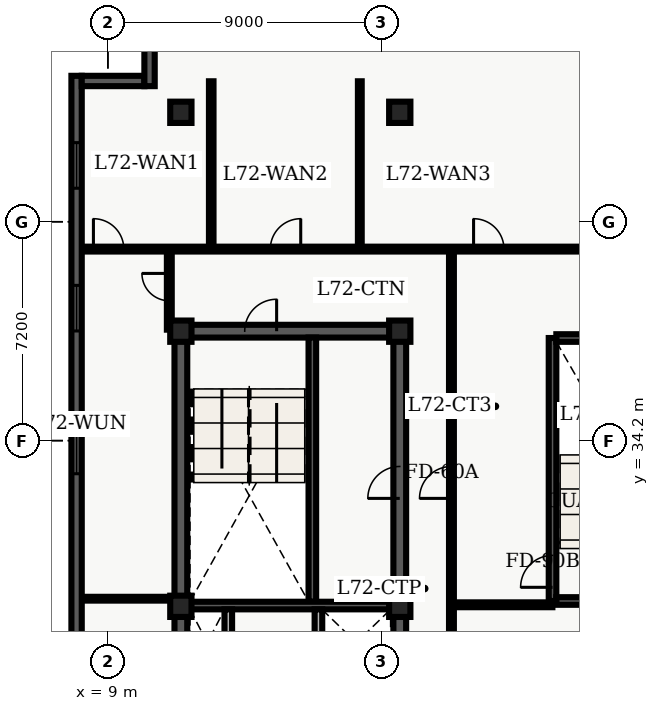
"""IFC4 building model, lengths in metres.
Left out: names, types, materials, properties, quantities, classifications, styles, units other than length and angle.
Written with IfcOpenShell. Run it as: python <this file> out.ifc"""

import sys

from ifc_helpers import new_model, entity, si_unit, converted_unit, direction, frame, origin_with_axes, origin_2d_with_axis, place, context, subcontext, project, spatial, polyline, rectangle, outline, extrude, element, fill, save


model = new_model("IFC4")
c1 = context("Model", 3, precision=1e-05, world=origin_with_axes(), true_north=direction((0.0, 1.0)))
c2 = subcontext(c1, "Body", "Model", "MODEL_VIEW")
j1 = project(units=[si_unit("LENGTHUNIT", "METRE"), converted_unit("PLANEANGLEUNIT", "DEGREE", entity("IfcPlaneAngleMeasure", 0.017), si_unit("PLANEANGLEUNIT", "RADIAN"), dimensions=[0, 0, 0, 0, 0, 0, 0])], contexts=[c1])
p1 = place(None, origin_with_axes())
s1 = spatial("IfcSite", under=j1, at=p1, CompositionType="ELEMENT")
p2 = place(p1, origin_with_axes())
s2 = spatial("IfcBuilding", under=s1, at=p2, CompositionType="ELEMENT")
p3 = place(p2, frame((0.0, 0.0, 291.9), z_axis=(0.0, 0.0, 1.0), x_axis=(1.0, 0.0, 0.0)))
s3 = spatial("IfcBuildingStorey", under=s2, at=p3, CompositionType="ELEMENT", Elevation=291.9)
p4 = place(p3, frame((11.4, 10.8, 0.0), z_axis=(0.0, 0.0, 1.0), x_axis=(0.0, 1.0, 0.0)))
e1 = element("IfcWall", 1, at=p4, inside=s3, PredefinedType="SHEAR", context=c2, shape_type="SweptSolid", body=[
    extrude(outline(polyline([(0.0, -0.21), (27.0, -0.21), (27.0, 0.21), (0.0, 0.21), (0.0, -0.21)])), origin_with_axes(), (0.0, 0.0, 1.0), 3.66),
])
p5 = place(p3, frame((11.4, 37.8, 0.0), z_axis=(0.0, 0.0, 1.0), x_axis=(1.0, 0.0, 0.0)))
e2 = element("IfcWall", 2, at=p5, inside=s3, PredefinedType="SHEAR", context=c2, shape_type="SweptSolid", body=[
    extrude(outline(polyline([(0.0, -0.21), (7.2, -0.21), (7.2, 0.21), (0.0, 0.21), (0.0, -0.21)])), origin_with_axes(), (0.0, 0.0, 1.0), 3.66),
])
p6 = place(p5, frame((2.625, 0.0, 0.0), z_axis=(0.0, 0.0, 1.0), x_axis=(1.0, 0.0, 0.0)))
e3 = element("IfcOpeningElement", 3, at=p6, cuts=e2, PredefinedType="OPENING", context=c2, shape_type="SweptSolid", body=[
    extrude(rectangle(XDim=1.05, YDim=0.44, at=origin_2d_with_axis()), origin_with_axes(), (0.0, 0.0, 1.0), 2.15),
])
p7 = place(p3, frame((18.6, 24.3, 0.0), z_axis=(0.0, 0.0, 1.0), x_axis=(0.0, 1.0, 0.0)))
e4 = element("IfcWall", 4, at=p7, inside=s3, PredefinedType="SHEAR", context=c2, shape_type="SweptSolid", body=[
    extrude(outline(polyline([(0.0, -0.21), (13.5, -0.21), (13.5, 0.21), (0.0, 0.21), (0.0, -0.21)])), origin_with_axes(), (0.0, 0.0, 1.0), 3.66),
])
p8 = place(p7, frame((8.525, 0.0, 0.0), z_axis=(0.0, 0.0, 1.0), x_axis=(1.0, 0.0, 0.0)))
e5 = element("IfcOpeningElement", 5, at=p8, cuts=e4, PredefinedType="OPENING", context=c2, shape_type="SweptSolid", body=[
    extrude(rectangle(XDim=1.05, YDim=0.44, at=origin_2d_with_axis()), origin_with_axes(), (0.0, 0.0, 1.0), 2.15),
])
p9 = place(p3, frame((15.725, 28.9, 0.0), z_axis=(0.0, 0.0, 1.0), x_axis=(0.0, 1.0, 0.0)))
e6 = element("IfcWall", 6, at=p9, inside=s3, PredefinedType="SHEAR", context=c2, shape_type="SweptSolid", body=[
    extrude(outline(polyline([(0.0, -0.125), (8.69, -0.125), (8.69, 0.125), (0.0, 0.125), (0.0, -0.125)])), origin_with_axes(), (0.0, 0.0, 1.0), 3.66),
])
p10 = place(p3, frame((11.61, 28.775, 0.0), z_axis=(0.0, 0.0, 1.0), x_axis=(1.0, 0.0, 0.0)))
e7 = element("IfcWall", 7, at=p10, inside=s3, PredefinedType="SHEAR", context=c2, shape_type="SweptSolid", body=[
    extrude(outline(polyline([(0.0, -0.125), (6.78, -0.125), (6.78, 0.125), (0.0, 0.125), (0.0, -0.125)])), origin_with_axes(), (0.0, 0.0, 1.0), 3.66),
])
for number, where, z_axis, x_axis in (
    (8, (12.96, 26.45, 0.0), (0.0, 0.0, 1.0), (0.0, 1.0, 0.0)),
    (9, (15.925, 26.45, 0.0), (0.0, 0.0, 1.0), (0.0, 1.0, 0.0)),
):
    element("IfcWall", number, at=place(p3, frame(where, z_axis=z_axis, x_axis=x_axis)), inside=s3, PredefinedType="SOLIDWALL", context=c2, shape_type="SweptSolid", body=[
        extrude(outline(polyline([(0.0, -0.125), (2.2, -0.125), (2.2, 0.125), (0.0, 0.125), (0.0, -0.125)])), origin_with_axes(), (0.0, 0.0, 1.0), 2.7),
    ])
p11 = place(p3, frame((23.625, 28.925, 0.0), z_axis=(0.0, 0.0, 1.0), x_axis=(0.0, 1.0, 0.0)))
e10 = element("IfcWall", 10, at=p11, inside=s3, PredefinedType="SHEAR", context=c2, shape_type="SweptSolid", body=[
    extrude(outline(polyline([(0.0, -0.125), (8.65, -0.125), (8.65, 0.125), (0.0, 0.125), (0.0, -0.125)])), origin_with_axes(), (0.0, 0.0, 1.0), 3.66),
])
p12 = place(p11, frame((0.975, 0.0, 0.0), z_axis=(0.0, 0.0, 1.0), x_axis=(1.0, 0.0, 0.0)))
e11 = element("IfcOpeningElement", 11, at=p12, cuts=e10, PredefinedType="OPENING", context=c2, shape_type="SweptSolid", body=[
    extrude(rectangle(XDim=1.05, YDim=0.27, at=origin_2d_with_axis()), origin_with_axes(), (0.0, 0.0, 1.0), 2.15),
])
for number, where, z_axis, x_axis in (
    (12, (23.75, 28.925, 0.0), (0.0, 0.0, 1.0), (1.0, 0.0, 0.0)),
    (13, (23.75, 37.575, 0.0), (0.0, 0.0, 1.0), (1.0, 0.0, 0.0)),
):
    element("IfcWall", number, at=place(p3, frame(where, z_axis=z_axis, x_axis=x_axis)), inside=s3, PredefinedType="SHEAR", context=c2, shape_type="SweptSolid", body=[
        extrude(outline(polyline([(0.0, -0.125), (3.9, -0.125), (3.9, 0.125), (0.0, 0.125), (0.0, -0.125)])), origin_with_axes(), (0.0, 0.0, 1.0), 3.66),
    ])
for number, where, z_axis, x_axis in (
    (14, (11.4, 28.75, 0.0), (0.0, 0.0, 1.0), (1.0, 0.0, 0.0)),
    (15, (11.4, 37.8, 0.0), (0.0, 0.0, 1.0), (1.0, 0.0, 0.0)),
    (16, (11.4, 45.0, 0.0), (0.0, 0.0, 1.0), (1.0, 0.0, 0.0)),
    (17, (18.6, 28.75, 0.0), (0.0, 0.0, 1.0), (1.0, 0.0, 0.0)),
    (18, (18.6, 37.8, 0.0), (0.0, 0.0, 1.0), (1.0, 0.0, 0.0)),
    (19, (18.6, 45.0, 0.0), (0.0, 0.0, 1.0), (1.0, 0.0, 0.0)),
):
    element("IfcColumn", number, at=place(p3, frame(where, z_axis=z_axis, x_axis=x_axis)), inside=s3, PredefinedType="COLUMN", context=c2, shape_type="SweptSolid", body=[
        extrude(rectangle(XDim=0.7, YDim=0.7, at=origin_2d_with_axis()), origin_with_axes(), (0.0, 0.0, 1.0), 3.9),
    ])
p13 = place(p3, frame((8.135, 40.5, 0.0), z_axis=(0.0, 0.0, 1.0), x_axis=(1.0, 0.0, 0.0)))
e20 = element("IfcWall", 20, at=p13, inside=s3, PredefinedType="PARTITIONING", context=c2, shape_type="SweptSolid", body=[
    extrude(outline(polyline([(0.0, -0.08), (23.93, -0.08), (23.93, 0.08), (0.0, 0.08), (0.0, -0.08)])), origin_with_axes(), (0.0, 0.0, 1.0), 2.7),
])
p14 = place(p13, frame((0.889, 0.0, 0.0), z_axis=(0.0, 0.0, 1.0), x_axis=(1.0, 0.0, 0.0)))
e21 = element("IfcOpeningElement", 21, at=p14, cuts=e20, PredefinedType="OPENING", context=c2, shape_type="SweptSolid", body=[
    extrude(rectangle(XDim=1.0, YDim=0.18, at=origin_2d_with_axis()), origin_with_axes(), (0.0, 0.0, 1.0), 2.15),
])
p15 = place(p13, frame((6.707, 0.0, 0.0), z_axis=(0.0, 0.0, 1.0), x_axis=(1.0, 0.0, 0.0)))
e22 = element("IfcOpeningElement", 22, at=p15, cuts=e20, PredefinedType="OPENING", context=c2, shape_type="SweptSolid", body=[
    extrude(rectangle(XDim=1.0, YDim=0.18, at=origin_2d_with_axis()), origin_with_axes(), (0.0, 0.0, 1.0), 2.15),
])
p16 = place(p13, frame((13.393, 0.0, 0.0), z_axis=(0.0, 0.0, 1.0), x_axis=(1.0, 0.0, 0.0)))
e23 = element("IfcOpeningElement", 23, at=p16, cuts=e20, PredefinedType="OPENING", context=c2, shape_type="SweptSolid", body=[
    extrude(rectangle(XDim=1.0, YDim=0.18, at=origin_2d_with_axis()), origin_with_axes(), (0.0, 0.0, 1.0), 2.15),
])
p17 = place(p3, frame((20.3, 0.335, 0.0), z_axis=(0.0, 0.0, 1.0), x_axis=(0.0, 1.0, 0.0)))
e24 = element("IfcWall", 24, at=p17, inside=s3, PredefinedType="PARTITIONING", context=c2, shape_type="SweptSolid", body=[
    extrude(outline(polyline([(0.0, -0.08), (40.165, -0.08), (40.165, 0.08), (0.0, 0.08), (0.0, -0.08)])), origin_with_axes(), (0.0, 0.0, 1.0), 2.7),
])
p18 = place(p17, frame((32.49, 0.0, 0.0), z_axis=(0.0, 0.0, 1.0), x_axis=(1.0, 0.0, 0.0)))
e25 = element("IfcOpeningElement", 25, at=p18, cuts=e24, PredefinedType="OPENING", context=c2, shape_type="SweptSolid", body=[
    extrude(rectangle(XDim=1.05, YDim=0.18, at=origin_2d_with_axis()), origin_with_axes(), (0.0, 0.0, 1.0), 2.15),
])
p19 = place(p17, frame((5.089, 0.0, 0.0), z_axis=(0.0, 0.0, 1.0), x_axis=(1.0, 0.0, 0.0)))
e26 = element("IfcOpeningElement", 26, at=p19, cuts=e24, PredefinedType="OPENING", context=c2, shape_type="SweptSolid", body=[
    extrude(rectangle(XDim=1.0, YDim=0.18, at=origin_2d_with_axis()), origin_with_axes(), (0.0, 0.0, 1.0), 2.15),
])
p20 = place(p17, frame((17.578, 0.0, 0.0), z_axis=(0.0, 0.0, 1.0), x_axis=(1.0, 0.0, 0.0)))
e27 = element("IfcOpeningElement", 27, at=p20, cuts=e24, PredefinedType="OPENING", context=c2, shape_type="SweptSolid", body=[
    extrude(rectangle(XDim=1.0, YDim=0.18, at=origin_2d_with_axis()), origin_with_axes(), (0.0, 0.0, 1.0), 2.15),
])
p21 = place(p17, frame((25.079, 0.0, 0.0), z_axis=(0.0, 0.0, 1.0), x_axis=(1.0, 0.0, 0.0)))
e28 = element("IfcOpeningElement", 28, at=p21, cuts=e24, PredefinedType="OPENING", context=c2, shape_type="SweptSolid", body=[
    extrude(rectangle(XDim=1.0, YDim=0.18, at=origin_2d_with_axis()), origin_with_axes(), (0.0, 0.0, 1.0), 2.15),
])
p22 = place(p3, frame((20.3, 28.8, 0.0), z_axis=(0.0, 0.0, 1.0), x_axis=(1.0, 0.0, 0.0)))
e29 = element("IfcWall", 29, at=p22, inside=s3, PredefinedType="PARTITIONING", context=c2, shape_type="SweptSolid", body=[
    extrude(outline(polyline([(0.0, -0.08), (3.32, -0.08), (3.32, 0.08), (0.0, 0.08), (0.0, -0.08)])), origin_with_axes(), (0.0, 0.0, 1.0), 2.7),
])
p23 = place(p3, frame((11.02, 37.85, 0.0), z_axis=(0.0, 0.0, 1.0), x_axis=(0.0, 1.0, 0.0)))
e30 = element("IfcWall", 30, at=p23, inside=s3, PredefinedType="PARTITIONING", context=c2, shape_type="SweptSolid", body=[
    extrude(outline(polyline([(0.0, -0.08), (2.65, -0.08), (2.65, 0.08), (0.0, 0.08), (0.0, -0.08)])), origin_with_axes(), (0.0, 0.0, 1.0), 2.7),
])
p24 = place(p23, frame((1.4, 0.0, 0.0), z_axis=(0.0, 0.0, 1.0), x_axis=(1.0, 0.0, 0.0)))
e31 = element("IfcOpeningElement", 31, at=p24, cuts=e30, PredefinedType="OPENING", context=c2, shape_type="SweptSolid", body=[
    extrude(rectangle(XDim=0.9, YDim=0.18, at=origin_2d_with_axis()), origin_with_axes(), (0.0, 0.0, 1.0), 2.15),
])
p25 = place(p3, frame((8.135, 29.0, 0.0), z_axis=(0.0, 0.0, 1.0), x_axis=(1.0, 0.0, 0.0)))
e32 = element("IfcWall", 32, at=p25, inside=s3, PredefinedType="PARTITIONING", context=c2, shape_type="SweptSolid", body=[
    extrude(outline(polyline([(0.0, -0.062), (3.135, -0.062), (3.135, 0.062), (0.0, 0.062), (0.0, -0.062)])), origin_with_axes(), (0.0, 0.0, 1.0), 2.7),
])
p26 = place(p3, frame((12.399, 40.6, 0.0), z_axis=(0.0, 0.0, 1.0), x_axis=(0.0, 1.0, 0.0)))
e33 = element("IfcWall", 33, at=p26, inside=s3, PredefinedType="PARTITIONING", context=c2, shape_type="SweptSolid", body=[
    extrude(outline(polyline([(0.0, -0.075), (5.42, -0.075), (5.42, 0.075), (0.0, 0.075), (0.0, -0.075)])), origin_with_axes(), (0.0, 0.0, 1.0), 2.7),
])
p27 = place(p3, frame((17.286, 40.6, 0.0), z_axis=(0.0, 0.0, 1.0), x_axis=(0.0, 1.0, 0.0)))
e34 = element("IfcWall", 34, at=p27, inside=s3, PredefinedType="PARTITIONING", context=c2, shape_type="SweptSolid", body=[
    extrude(outline(polyline([(0.0, -0.062), (5.42, -0.062), (5.42, 0.062), (0.0, 0.062), (0.0, -0.062)])), origin_with_axes(), (0.0, 0.0, 1.0), 2.7),
])
p28 = place(p3, frame((7.97, 2.74, 0.0), z_axis=(0.0, 0.0, 1.0), x_axis=(0.0, 1.0, 0.0)))
e35 = element("IfcWall", 35, at=p28, inside=s3, PredefinedType="SOLIDWALL", context=c2, shape_type="SweptSolid", body=[
    extrude(outline(polyline([(0.0, -0.17), (43.46, -0.17), (43.46, 0.17), (0.0, 0.17), (0.0, -0.17)])), origin_with_axes(), (0.0, 0.0, 1.0), 3.66),
])
p29 = place(p28, frame((2.948, 0.0, 0.45), z_axis=(0.0, 0.0, 1.0), x_axis=(1.0, 0.0, 0.0)))
e36 = element("IfcOpeningElement", 36, at=p29, cuts=e35, PredefinedType="OPENING", context=c2, shape_type="SweptSolid", body=[
    extrude(rectangle(XDim=1.5, YDim=0.36, at=origin_2d_with_axis()), origin_with_axes(), (0.0, 0.0, 1.0), 2.1),
])
p30 = place(p28, frame((7.643, 0.0, 0.45), z_axis=(0.0, 0.0, 1.0), x_axis=(1.0, 0.0, 0.0)))
e37 = element("IfcOpeningElement", 37, at=p30, cuts=e35, PredefinedType="OPENING", context=c2, shape_type="SweptSolid", body=[
    extrude(rectangle(XDim=1.5, YDim=0.36, at=origin_2d_with_axis()), origin_with_axes(), (0.0, 0.0, 1.0), 2.1),
])
p31 = place(p28, frame((12.339, 0.0, 0.45), z_axis=(0.0, 0.0, 1.0), x_axis=(1.0, 0.0, 0.0)))
e38 = element("IfcOpeningElement", 38, at=p31, cuts=e35, PredefinedType="OPENING", context=c2, shape_type="SweptSolid", body=[
    extrude(rectangle(XDim=1.5, YDim=0.36, at=origin_2d_with_axis()), origin_with_axes(), (0.0, 0.0, 1.0), 2.1),
])
p32 = place(p28, frame((21.73, 0.0, 0.45), z_axis=(0.0, 0.0, 1.0), x_axis=(1.0, 0.0, 0.0)))
e39 = element("IfcOpeningElement", 39, at=p32, cuts=e35, PredefinedType="OPENING", context=c2, shape_type="SweptSolid", body=[
    extrude(rectangle(XDim=1.5, YDim=0.36, at=origin_2d_with_axis()), origin_with_axes(), (0.0, 0.0, 1.0), 2.1),
])
p33 = place(p28, frame((31.121, 0.0, 0.45), z_axis=(0.0, 0.0, 1.0), x_axis=(1.0, 0.0, 0.0)))
e40 = element("IfcOpeningElement", 40, at=p33, cuts=e35, PredefinedType="OPENING", context=c2, shape_type="SweptSolid", body=[
    extrude(rectangle(XDim=1.5, YDim=0.36, at=origin_2d_with_axis()), origin_with_axes(), (0.0, 0.0, 1.0), 2.1),
])
p34 = place(p28, frame((35.817, 0.0, 0.45), z_axis=(0.0, 0.0, 1.0), x_axis=(1.0, 0.0, 0.0)))
e41 = element("IfcOpeningElement", 41, at=p34, cuts=e35, PredefinedType="OPENING", context=c2, shape_type="SweptSolid", body=[
    extrude(rectangle(XDim=1.5, YDim=0.36, at=origin_2d_with_axis()), origin_with_axes(), (0.0, 0.0, 1.0), 2.1),
])
p35 = place(p28, frame((40.512, 0.0, 0.45), z_axis=(0.0, 0.0, 1.0), x_axis=(1.0, 0.0, 0.0)))
e42 = element("IfcOpeningElement", 42, at=p35, cuts=e35, PredefinedType="OPENING", context=c2, shape_type="SweptSolid", body=[
    extrude(rectangle(XDim=1.5, YDim=0.36, at=origin_2d_with_axis()), origin_with_axes(), (0.0, 0.0, 1.0), 2.1),
])
p36 = place(p3, frame((8.14, 46.03, 0.0), z_axis=(0.0, 0.0, 1.0), x_axis=(1.0, 0.0, 0.0)))
e43 = element("IfcWall", 43, at=p36, inside=s3, PredefinedType="SOLIDWALL", context=c2, shape_type="SweptSolid", body=[
    extrude(outline(polyline([(0.0, -0.17), (2.06, -0.17), (2.06, 0.17), (0.0, 0.17), (0.0, -0.17)])), origin_with_axes(), (0.0, 0.0, 1.0), 3.66),
])
p37 = place(p3, frame((10.37, 45.86, 0.0), z_axis=(0.0, 0.0, 1.0), x_axis=(0.0, 1.0, 0.0)))
e44 = element("IfcWall", 44, at=p37, inside=s3, PredefinedType="SOLIDWALL", context=c2, shape_type="SweptSolid", body=[
    extrude(outline(polyline([(0.0, -0.17), (2.74, -0.17), (2.74, 0.17), (0.0, 0.17), (0.0, -0.17)])), origin_with_axes(), (0.0, 0.0, 1.0), 3.66),
])
p38 = place(p5, frame((2.625, 0.0, 0.0), z_axis=(0.0, 0.0, 1.0), x_axis=(1.0, 0.0, 0.0)))
e45 = element("IfcDoor", 45, at=p38, inside=s3, OperationType="SINGLE_SWING_RIGHT", PredefinedType="DOOR", context=c2, shape_type="SweptSolid", body=[
    extrude(rectangle(XDim=1.05, YDim=0.09, at=origin_2d_with_axis()), origin_with_axes(), (0.0, 0.0, 1.0), 2.15),
])
fill(e3, e45)
p39 = place(p7, frame((8.525, 0.0, 0.0), z_axis=(0.0, 0.0, 1.0), x_axis=(1.0, 0.0, 0.0)))
e46 = element("IfcDoor", 46, at=p39, inside=s3, OperationType="SINGLE_SWING_LEFT", PredefinedType="DOOR", context=c2, shape_type="SweptSolid", body=[
    extrude(rectangle(XDim=1.05, YDim=0.09, at=origin_2d_with_axis()), origin_with_axes(), (0.0, 0.0, 1.0), 2.15),
])
fill(e5, e46)
p40 = place(p11, frame((0.975, 0.0, 0.0), z_axis=(0.0, 0.0, 1.0), x_axis=(1.0, 0.0, 0.0)))
e47 = element("IfcDoor", 47, at=p40, inside=s3, OperationType="SINGLE_SWING_LEFT", PredefinedType="DOOR", context=c2, shape_type="SweptSolid", body=[
    extrude(rectangle(XDim=1.05, YDim=0.09, at=origin_2d_with_axis()), origin_with_axes(), (0.0, 0.0, 1.0), 2.15),
])
fill(e11, e47)
p41 = place(p17, frame((32.49, 0.0, 0.0), z_axis=(0.0, 0.0, 1.0), x_axis=(1.0, 0.0, 0.0)))
e48 = element("IfcDoor", 48, at=p41, inside=s3, OperationType="SINGLE_SWING_LEFT", PredefinedType="DOOR", context=c2, shape_type="SweptSolid", body=[
    extrude(rectangle(XDim=1.05, YDim=0.09, at=origin_2d_with_axis()), origin_with_axes(), (0.0, 0.0, 1.0), 2.15),
])
fill(e25, e48)
p42 = place(p23, frame((1.4, 0.0, 0.0), z_axis=(0.0, 0.0, 1.0), x_axis=(1.0, 0.0, 0.0)))
e49 = element("IfcDoor", 49, at=p42, inside=s3, OperationType="SINGLE_SWING_RIGHT", PredefinedType="DOOR", context=c2, shape_type="SweptSolid", body=[
    extrude(rectangle(XDim=0.9, YDim=0.09, at=origin_2d_with_axis()), origin_with_axes(), (0.0, 0.0, 1.0), 2.15),
])
fill(e31, e49)
p43 = place(p13, frame((0.889, 0.0, 0.0), z_axis=(0.0, 0.0, 1.0), x_axis=(1.0, 0.0, 0.0)))
e50 = element("IfcDoor", 50, at=p43, inside=s3, OperationType="SINGLE_SWING_LEFT", PredefinedType="DOOR", context=c2, shape_type="SweptSolid", body=[
    extrude(rectangle(XDim=1.0, YDim=0.09, at=origin_2d_with_axis()), origin_with_axes(), (0.0, 0.0, 1.0), 2.15),
])
fill(e21, e50)
p44 = place(p13, frame((6.707, 0.0, 0.0), z_axis=(0.0, 0.0, 1.0), x_axis=(1.0, 0.0, 0.0)))
e51 = element("IfcDoor", 51, at=p44, inside=s3, OperationType="SINGLE_SWING_RIGHT", PredefinedType="DOOR", context=c2, shape_type="SweptSolid", body=[
    extrude(rectangle(XDim=1.0, YDim=0.09, at=origin_2d_with_axis()), origin_with_axes(), (0.0, 0.0, 1.0), 2.15),
])
fill(e22, e51)
p45 = place(p13, frame((13.393, 0.0, 0.0), z_axis=(0.0, 0.0, 1.0), x_axis=(1.0, 0.0, 0.0)))
e52 = element("IfcDoor", 52, at=p45, inside=s3, OperationType="SINGLE_SWING_LEFT", PredefinedType="DOOR", context=c2, shape_type="SweptSolid", body=[
    extrude(rectangle(XDim=1.0, YDim=0.09, at=origin_2d_with_axis()), origin_with_axes(), (0.0, 0.0, 1.0), 2.15),
])
fill(e23, e52)
p46 = place(p28, frame((31.121, 0.0, 0.45), z_axis=(0.0, 0.0, 1.0), x_axis=(1.0, 0.0, 0.0)))
e53 = element("IfcWindow", 53, at=p46, inside=s3, PredefinedType="WINDOW", context=c2, shape_type="SweptSolid", body=[
    extrude(rectangle(XDim=1.5, YDim=0.09, at=origin_2d_with_axis()), origin_with_axes(), (0.0, 0.0, 1.0), 2.1),
])
fill(e40, e53)
p47 = place(p28, frame((35.817, 0.0, 0.45), z_axis=(0.0, 0.0, 1.0), x_axis=(1.0, 0.0, 0.0)))
e54 = element("IfcWindow", 54, at=p47, inside=s3, PredefinedType="WINDOW", context=c2, shape_type="SweptSolid", body=[
    extrude(rectangle(XDim=1.5, YDim=0.09, at=origin_2d_with_axis()), origin_with_axes(), (0.0, 0.0, 1.0), 2.1),
])
fill(e41, e54)
p48 = place(p28, frame((40.512, 0.0, 0.45), z_axis=(0.0, 0.0, 1.0), x_axis=(1.0, 0.0, 0.0)))
e55 = element("IfcWindow", 55, at=p48, inside=s3, PredefinedType="WINDOW", context=c2, shape_type="SweptSolid", body=[
    extrude(rectangle(XDim=1.5, YDim=0.09, at=origin_2d_with_axis()), origin_with_axes(), (0.0, 0.0, 1.0), 2.1),
])
fill(e42, e55)
save(model, sys.argv[1])
